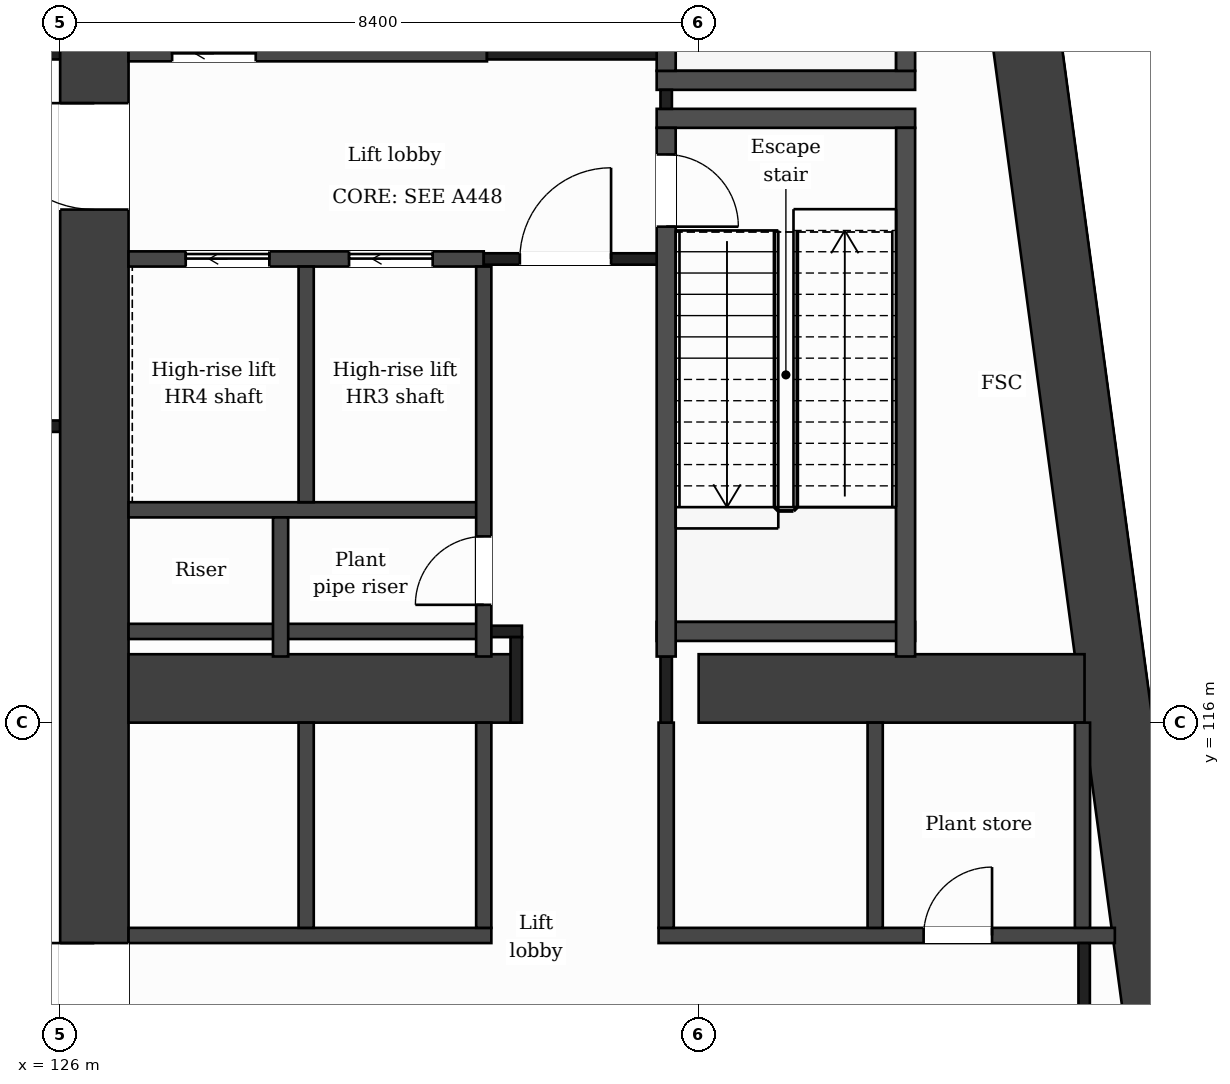
"""IFC4 building model, lengths in metres.
Left out: names, types, materials, properties, quantities, classifications, styles, units other than length and angle.
Written with IfcOpenShell. Run it as: python <this file> out.ifc"""

import sys

from ifc_helpers import new_model, si_unit, direction, frame, frame_2d, origin, place, context, subcontext, project, spatial, rectangle, extrude, element, fill, save


model = new_model("IFC4")
c1 = context("Model", 3, precision=1e-05, world=origin(), true_north=direction((0.0, 1.0)))
c2 = subcontext(c1, "Body", "Model", "MODEL_VIEW")
j1 = project(units=[si_unit("LENGTHUNIT", "METRE"), si_unit("PLANEANGLEUNIT", "RADIAN")], contexts=[c1])
p1 = place(None, origin())
s1 = spatial("IfcSite", under=j1, at=p1, CompositionType="ELEMENT")
p2 = place(p1, origin())
s2 = spatial("IfcBuilding", under=s1, at=p2, CompositionType="ELEMENT")
p3 = place(p2, frame((0.0, 0.0, 197.2)))
s3 = spatial("IfcBuildingStorey", under=s2, at=p3, CompositionType="ELEMENT", Elevation=197.2)
p4 = place(p3, frame((137.776, 131.95, 0.0), z_axis=(0.0, 0.0, 1.0), x_axis=(0.133421759112, -0.991059349482, 0.0)))
e1 = element("IfcWall", 1, at=p4, inside=s3, PredefinedType="SHEAR", context=c2, shape_type="SweptSolid", body=[
    extrude(rectangle(XDim=21.29, YDim=0.9, at=frame_2d((10.645, 0.0))), origin(), (0.0, 0.0, 1.0), 5.0),
])
p5 = place(p3, frame((126.45, 110.85, 0.0), z_axis=(0.0, 0.0, 1.0), x_axis=(0.0, 1.0, 0.0)))
e2 = element("IfcWall", 2, at=p5, inside=s3, PredefinedType="SHEAR", context=c2, shape_type="SweptSolid", body=[
    extrude(rectangle(XDim=21.1, YDim=0.9, at=frame_2d((10.55, 0.0))), origin(), (0.0, 0.0, 1.0), 5.0),
])
p6 = place(p5, frame((1.05, 0.0, 0.0)))
e3 = element("IfcOpeningElement", 3, at=p6, cuts=e2, PredefinedType="OPENING", context=c2, shape_type="SweptSolid", body=[
    extrude(rectangle(XDim=1.2, YDim=2.1, at=frame_2d((0.6, 1.05))), frame((0.0, 0.46, 0.0), z_axis=(0.0, -1.0, 0.0), x_axis=(1.0, 0.0, 0.0)), (0.0, 0.0, 1.0), 0.92),
])
p7 = place(p5, frame((11.9, 0.0, 0.0)))
e4 = element("IfcOpeningElement", 4, at=p7, cuts=e2, PredefinedType="OPENING", context=c2, shape_type="SweptSolid", body=[
    extrude(rectangle(XDim=1.4, YDim=2.1, at=frame_2d((0.7, 1.05))), frame((0.0, 0.46, 0.0), z_axis=(0.0, -1.0, 0.0), x_axis=(1.0, 0.0, 0.0)), (0.0, 0.0, 1.0), 0.92),
])
p8 = place(p3, frame((126.9, 116.45, 0.0), z_axis=(0.0, 0.0, 1.0), x_axis=(1.0, 0.0, 0.0)))
e5 = element("IfcWall", 5, at=p8, inside=s3, PredefinedType="SHEAR", context=c2, shape_type="SweptSolid", body=[
    extrude(rectangle(XDim=5.1, YDim=0.9, at=frame_2d((2.55, 0.0))), origin(), (0.0, 0.0, 1.0), 5.0),
])
p9 = place(p3, frame((134.4, 116.45, 0.0), z_axis=(0.0, 0.0, 1.0), x_axis=(1.0, 0.0, 0.0)))
e6 = element("IfcWall", 6, at=p9, inside=s3, PredefinedType="SHEAR", context=c2, shape_type="SweptSolid", body=[
    extrude(rectangle(XDim=5.077, YDim=0.9, at=frame_2d((2.539, 0.0))), origin(), (0.0, 0.0, 1.0), 5.0),
])
p10 = place(p3, frame((126.9, 113.2, 0.0), z_axis=(0.0, 0.0, 1.0), x_axis=(1.0, 0.0, 0.0)))
e7 = element("IfcWall", 7, at=p10, inside=s3, PredefinedType="PARTITIONING", context=c2, shape_type="SweptSolid", body=[
    extrude(rectangle(XDim=4.773, YDim=0.2, at=frame_2d((2.387, 0.0))), origin(), (0.0, 0.0, 1.0), 4.68),
])
p11 = place(p3, frame((133.873, 113.2, 0.0), z_axis=(0.0, 0.0, 1.0), x_axis=(1.0, 0.0, 0.0)))
e8 = element("IfcWall", 8, at=p11, inside=s3, PredefinedType="PARTITIONING", context=c2, shape_type="SweptSolid", body=[
    extrude(rectangle(XDim=6.003, YDim=0.2, at=frame_2d((3.001, 0.0))), origin(), (0.0, 0.0, 1.0), 4.68),
])
p12 = place(p11, frame((3.487, 0.0, 0.0)))
e9 = element("IfcOpeningElement", 9, at=p12, cuts=e8, PredefinedType="OPENING", context=c2, shape_type="SweptSolid", body=[
    extrude(rectangle(XDim=0.9, YDim=2.1, at=frame_2d((0.45, 1.05))), frame((0.0, 0.11, 0.0), z_axis=(0.0, -1.0, 0.0), x_axis=(1.0, 0.0, 0.0)), (0.0, 0.0, 1.0), 0.22),
])
p13 = place(p3, frame((126.9, 117.2, 0.0), z_axis=(0.0, 0.0, 1.0), x_axis=(1.0, 0.0, 0.0)))
e10 = element("IfcWall", 10, at=p13, inside=s3, PredefinedType="PARTITIONING", context=c2, shape_type="SweptSolid", body=[
    extrude(rectangle(XDim=4.673, YDim=0.2, at=frame_2d((2.336, 0.0))), origin(), (0.0, 0.0, 1.0), 4.68),
])
p14 = place(p3, frame((131.573, 117.2, 0.0), z_axis=(0.0, 0.0, 1.0), x_axis=(1.0, 0.0, 0.0)))
e11 = element("IfcWall", 11, at=p14, inside=s3, PredefinedType="PARTITIONING", context=c2, shape_type="SweptSolid", body=[
    extrude(rectangle(XDim=0.502, YDim=0.15, at=frame_2d((0.251, 0.0))), origin(), (0.0, 0.0, 1.0), 4.68),
])
p15 = place(p3, frame((133.848, 117.2, 0.0), z_axis=(0.0, 0.0, 1.0), x_axis=(1.0, 0.0, 0.0)))
e12 = element("IfcWall", 12, at=p15, inside=s3, PredefinedType="PARTITIONING", context=c2, shape_type="SweptSolid", body=[
    extrude(rectangle(XDim=3.4, YDim=0.25, at=frame_2d((1.7, 0.0))), origin(), (0.0, 0.0, 1.0), 4.68),
])
p16 = place(p3, frame((126.9, 118.8, 0.0), z_axis=(0.0, 0.0, 1.0), x_axis=(1.0, 0.0, 0.0)))
e13 = element("IfcWall", 13, at=p16, inside=s3, PredefinedType="PARTITIONING", context=c2, shape_type="SweptSolid", body=[
    extrude(rectangle(XDim=4.673, YDim=0.2, at=frame_2d((2.336, 0.0))), origin(), (0.0, 0.0, 1.0), 4.68),
])
p17 = place(p3, frame((100.8, 119.9, 0.0), z_axis=(0.0, 0.0, 1.0), x_axis=(1.0, 0.0, 0.0)))
e14 = element("IfcWall", 14, at=p17, inside=s3, PredefinedType="PARTITIONING", context=c2, shape_type="SweptSolid", body=[
    extrude(rectangle(XDim=25.2, YDim=0.15, at=frame_2d((12.6, 0.0))), origin(), (0.0, 0.0, 1.0), 4.68),
])
p18 = place(p17, frame((3.6, 0.0, 0.0)))
e15 = element("IfcOpeningElement", 15, at=p18, cuts=e14, PredefinedType="OPENING", context=c2, shape_type="SweptSolid", body=[
    extrude(rectangle(XDim=1.2, YDim=2.1, at=frame_2d((0.6, 1.05))), frame((0.0, 0.085, 0.0), z_axis=(0.0, -1.0, 0.0), x_axis=(1.0, 0.0, 0.0)), (0.0, 0.0, 1.0), 0.17),
])
p19 = place(p17, frame((12.0, 0.0, 0.0)))
e16 = element("IfcOpeningElement", 16, at=p19, cuts=e14, PredefinedType="OPENING", context=c2, shape_type="SweptSolid", body=[
    extrude(rectangle(XDim=1.2, YDim=2.1, at=frame_2d((0.6, 1.05))), frame((0.0, 0.085, 0.0), z_axis=(0.0, -1.0, 0.0), x_axis=(1.0, 0.0, 0.0)), (0.0, 0.0, 1.0), 0.17),
])
p20 = place(p17, frame((20.4, 0.0, 0.0)))
e17 = element("IfcOpeningElement", 17, at=p20, cuts=e14, PredefinedType="OPENING", context=c2, shape_type="SweptSolid", body=[
    extrude(rectangle(XDim=1.2, YDim=2.1, at=frame_2d((0.6, 1.05))), frame((0.0, 0.085, 0.0), z_axis=(0.0, -1.0, 0.0), x_axis=(1.0, 0.0, 0.0)), (0.0, 0.0, 1.0), 0.17),
])
p21 = place(p3, frame((126.9, 122.1, 0.0), z_axis=(0.0, 0.0, 1.0), x_axis=(1.0, 0.0, 0.0)))
e18 = element("IfcWall", 18, at=p21, inside=s3, PredefinedType="PARTITIONING", context=c2, shape_type="SweptSolid", body=[
    extrude(rectangle(XDim=4.673, YDim=0.2, at=frame_2d((2.336, 0.0))), origin(), (0.0, 0.0, 1.0), 4.68),
])
p22 = place(p21, frame((2.901, 0.0, 0.0)))
e19 = element("IfcOpeningElement", 19, at=p22, cuts=e18, PredefinedType="OPENING", context=c2, shape_type="SweptSolid", body=[
    extrude(rectangle(XDim=1.1, YDim=2.1, at=frame_2d((0.55, 1.05))), frame((0.0, 0.11, 0.0), z_axis=(0.0, -1.0, 0.0), x_axis=(1.0, 0.0, 0.0)), (0.0, 0.0, 1.0), 0.22),
])
p23 = place(p21, frame((0.752, 0.0, 0.0)))
e20 = element("IfcOpeningElement", 20, at=p23, cuts=e18, PredefinedType="OPENING", context=c2, shape_type="SweptSolid", body=[
    extrude(rectangle(XDim=1.1, YDim=2.1, at=frame_2d((0.55, 1.05))), frame((0.0, 0.11, 0.0), z_axis=(0.0, -1.0, 0.0), x_axis=(1.0, 0.0, 0.0)), (0.0, 0.0, 1.0), 0.22),
])
p24 = place(p3, frame((131.573, 122.1, 0.0), z_axis=(0.0, 0.0, 1.0), x_axis=(1.0, 0.0, 0.0)))
e21 = element("IfcWall", 21, at=p24, inside=s3, PredefinedType="PARTITIONING", context=c2, shape_type="SweptSolid", body=[
    extrude(rectangle(XDim=2.4, YDim=0.15, at=frame_2d((1.2, 0.0))), origin(), (0.0, 0.0, 1.0), 4.68),
])
p25 = place(p24, frame((0.475, 0.0, 0.0)))
e22 = element("IfcOpeningElement", 22, at=p25, cuts=e21, PredefinedType="OPENING", context=c2, shape_type="SweptSolid", body=[
    extrude(rectangle(XDim=1.2, YDim=2.1, at=frame_2d((0.6, 1.05))), frame((0.0, 0.085, 0.0), z_axis=(0.0, -1.0, 0.0), x_axis=(1.0, 0.0, 0.0)), (0.0, 0.0, 1.0), 0.17),
])
for number, where, z_axis, x_axis in (
    (23, (133.848, 123.95, 0.0), (0.0, 0.0, 1.0), (1.0, 0.0, 0.0)),
    (24, (133.848, 124.45, 0.0), (0.0, 0.0, 1.0), (1.0, 0.0, 0.0)),
):
    element("IfcWall", number, at=place(p3, frame(where, z_axis=z_axis, x_axis=x_axis)), inside=s3, PredefinedType="PARTITIONING", context=c2, shape_type="SweptSolid", body=[
        extrude(rectangle(XDim=3.4, YDim=0.25, at=frame_2d((1.7, 0.0))), origin(), (0.0, 0.0, 1.0), 4.68),
    ])
p26 = place(p3, frame((126.9, 124.8, 0.0), z_axis=(0.0, 0.0, 1.0), x_axis=(1.0, 0.0, 0.0)))
e25 = element("IfcWall", 25, at=p26, inside=s3, PredefinedType="PARTITIONING", context=c2, shape_type="SweptSolid", body=[
    extrude(rectangle(XDim=4.715, YDim=0.2, at=frame_2d((2.358, 0.0))), origin(), (0.0, 0.0, 1.0), 4.68),
])
p27 = place(p26, frame((0.573, 0.0, 0.0)))
e26 = element("IfcOpeningElement", 26, at=p27, cuts=e25, PredefinedType="OPENING", context=c2, shape_type="SweptSolid", body=[
    extrude(rectangle(XDim=1.1, YDim=2.1, at=frame_2d((0.55, 1.05))), frame((0.0, 0.11, 0.0), z_axis=(0.0, -1.0, 0.0), x_axis=(1.0, 0.0, 0.0)), (0.0, 0.0, 1.0), 0.22),
])
p28 = place(p3, frame((131.615, 124.8, 0.0), z_axis=(0.0, 0.0, 1.0), x_axis=(1.0, 0.0, 0.0)))
e27 = element("IfcWall", 27, at=p28, inside=s3, PredefinedType="PARTITIONING", context=c2, shape_type="SweptSolid", body=[
    extrude(rectangle(XDim=2.483, YDim=0.15, at=frame_2d((1.241, 0.0))), origin(), (0.0, 0.0, 1.0), 4.68),
])
p29 = place(p3, frame((100.8, 124.8, 0.0), z_axis=(0.0, 0.0, 1.0), x_axis=(1.0, 0.0, 0.0)))
e28 = element("IfcWall", 28, at=p29, inside=s3, PredefinedType="PARTITIONING", context=c2, shape_type="SweptSolid", body=[
    extrude(rectangle(XDim=25.2, YDim=0.15, at=frame_2d((12.6, 0.0))), origin(), (0.0, 0.0, 1.0), 4.68),
])
p30 = place(p29, frame((3.6, 0.0, 0.0)))
e29 = element("IfcOpeningElement", 29, at=p30, cuts=e28, PredefinedType="OPENING", context=c2, shape_type="SweptSolid", body=[
    extrude(rectangle(XDim=1.2, YDim=2.1, at=frame_2d((0.6, 1.05))), frame((0.0, 0.085, 0.0), z_axis=(0.0, -1.0, 0.0), x_axis=(1.0, 0.0, 0.0)), (0.0, 0.0, 1.0), 0.17),
])
p31 = place(p29, frame((12.0, 0.0, 0.0)))
e30 = element("IfcOpeningElement", 30, at=p31, cuts=e28, PredefinedType="OPENING", context=c2, shape_type="SweptSolid", body=[
    extrude(rectangle(XDim=1.2, YDim=2.1, at=frame_2d((0.6, 1.05))), frame((0.0, 0.085, 0.0), z_axis=(0.0, -1.0, 0.0), x_axis=(1.0, 0.0, 0.0)), (0.0, 0.0, 1.0), 0.17),
])
p32 = place(p29, frame((20.4, 0.0, 0.0)))
e31 = element("IfcOpeningElement", 31, at=p32, cuts=e28, PredefinedType="OPENING", context=c2, shape_type="SweptSolid", body=[
    extrude(rectangle(XDim=1.2, YDim=2.1, at=frame_2d((0.6, 1.05))), frame((0.0, 0.085, 0.0), z_axis=(0.0, -1.0, 0.0), x_axis=(1.0, 0.0, 0.0)), (0.0, 0.0, 1.0), 0.17),
])
p33 = place(p3, frame((128.9, 116.87, 0.0), z_axis=(0.0, 0.0, 1.0), x_axis=(0.0, 1.0, 0.0)))
e32 = element("IfcWall", 32, at=p33, inside=s3, PredefinedType="PARTITIONING", context=c2, shape_type="SweptSolid", body=[
    extrude(rectangle(XDim=1.83, YDim=0.2, at=frame_2d((0.915, 0.0))), origin(), (0.0, 0.0, 1.0), 4.68),
])
p34 = place(p3, frame((129.237, 113.3, 0.0), z_axis=(0.0, 0.0, 1.0), x_axis=(0.0, 1.0, 0.0)))
e33 = element("IfcWall", 33, at=p34, inside=s3, PredefinedType="PARTITIONING", context=c2, shape_type="SweptSolid", body=[
    extrude(rectangle(XDim=2.7, YDim=0.2, at=frame_2d((1.35, 0.0))), origin(), (0.0, 0.0, 1.0), 4.68),
])
p35 = place(p3, frame((129.237, 118.9, 0.0), z_axis=(0.0, 0.0, 1.0), x_axis=(0.0, 1.0, 0.0)))
e34 = element("IfcWall", 34, at=p35, inside=s3, PredefinedType="PARTITIONING", context=c2, shape_type="SweptSolid", body=[
    extrude(rectangle(XDim=3.1, YDim=0.2, at=frame_2d((1.55, 0.0))), origin(), (0.0, 0.0, 1.0), 4.68),
])
p36 = place(p3, frame((131.573, 113.3, 0.0), z_axis=(0.0, 0.0, 1.0), x_axis=(0.0, 1.0, 0.0)))
e35 = element("IfcWall", 35, at=p36, inside=s3, PredefinedType="PARTITIONING", context=c2, shape_type="SweptSolid", body=[
    extrude(rectangle(XDim=2.7, YDim=0.2, at=frame_2d((1.35, 0.0))), origin(), (0.0, 0.0, 1.0), 4.68),
])
p37 = place(p3, frame((131.573, 116.87, 0.0), z_axis=(0.0, 0.0, 1.0), x_axis=(0.0, 1.0, 0.0)))
e36 = element("IfcWall", 36, at=p37, inside=s3, PredefinedType="PARTITIONING", context=c2, shape_type="SweptSolid", body=[
    extrude(rectangle(XDim=5.13, YDim=0.2, at=frame_2d((2.565, 0.0))), origin(), (0.0, 0.0, 1.0), 4.68),
])
p38 = place(p37, frame((0.68, 0.0, 0.0)))
e37 = element("IfcOpeningElement", 37, at=p38, cuts=e36, PredefinedType="OPENING", context=c2, shape_type="SweptSolid", body=[
    extrude(rectangle(XDim=0.9, YDim=2.1, at=frame_2d((0.45, 1.05))), frame((0.0, 0.11, 0.0), z_axis=(0.0, -1.0, 0.0), x_axis=(1.0, 0.0, 0.0)), (0.0, 0.0, 1.0), 0.22),
])
p39 = place(p3, frame((132.0, 116.0, 0.0), z_axis=(0.0, 0.0, 1.0), x_axis=(0.0, 1.0, 0.0)))
e38 = element("IfcWall", 38, at=p39, inside=s3, PredefinedType="PARTITIONING", context=c2, shape_type="SweptSolid", body=[
    extrude(rectangle(XDim=1.125, YDim=0.15, at=frame_2d((0.562, 0.0))), origin(), (0.0, 0.0, 1.0), 4.68),
])
p40 = place(p3, frame((133.973, 113.3, 0.0), z_axis=(0.0, 0.0, 1.0), x_axis=(0.0, 1.0, 0.0)))
e39 = element("IfcWall", 39, at=p40, inside=s3, PredefinedType="PARTITIONING", context=c2, shape_type="SweptSolid", body=[
    extrude(rectangle(XDim=2.7, YDim=0.2, at=frame_2d((1.35, 0.0))), origin(), (0.0, 0.0, 1.0), 4.68),
])
p41 = place(p3, frame((133.973, 116.0, 0.0), z_axis=(0.0, 0.0, 1.0), x_axis=(0.0, 1.0, 0.0)))
e40 = element("IfcWall", 40, at=p41, inside=s3, PredefinedType="PARTITIONING", context=c2, shape_type="SweptSolid", body=[
    extrude(rectangle(XDim=0.87, YDim=0.15, at=frame_2d((0.435, 0.0))), origin(), (0.0, 0.0, 1.0), 4.68),
])
p42 = place(p3, frame((133.973, 124.075, 0.0), z_axis=(0.0, 0.0, 1.0), x_axis=(0.0, 1.0, 0.0)))
e41 = element("IfcWall", 41, at=p42, inside=s3, PredefinedType="PARTITIONING", context=c2, shape_type="SweptSolid", body=[
    extrude(rectangle(XDim=0.25, YDim=0.15, at=frame_2d((0.125, 0.0))), origin(), (0.0, 0.0, 1.0), 4.68),
])
p43 = place(p3, frame((133.973, 116.87, 0.0), z_axis=(0.0, 0.0, 1.0), x_axis=(0.0, 1.0, 0.0)))
e42 = element("IfcWall", 42, at=p43, inside=s3, PredefinedType="PARTITIONING", context=c2, shape_type="SweptSolid", body=[
    extrude(rectangle(XDim=6.955, YDim=0.25, at=frame_2d((3.478, 0.0))), origin(), (0.0, 0.0, 1.0), 4.68),
])
p44 = place(p43, frame((5.655, 0.0, 0.0)))
e43 = element("IfcOpeningElement", 43, at=p44, cuts=e42, PredefinedType="OPENING", context=c2, shape_type="SweptSolid", body=[
    extrude(rectangle(XDim=0.95, YDim=2.1, at=frame_2d((0.475, 1.05))), frame((0.0, 0.135, 0.0), z_axis=(0.0, -1.0, 0.0), x_axis=(1.0, 0.0, 0.0)), (0.0, 0.0, 1.0), 0.27),
])
p45 = place(p3, frame((133.973, 124.575, 0.0), z_axis=(0.0, 0.0, 1.0), x_axis=(0.0, 1.0, 0.0)))
e44 = element("IfcWall", 44, at=p45, inside=s3, PredefinedType="PARTITIONING", context=c2, shape_type="SweptSolid", body=[
    extrude(rectangle(XDim=6.955, YDim=0.25, at=frame_2d((3.478, 0.0))), origin(), (0.0, 0.0, 1.0), 4.68),
])
p46 = place(p45, frame((5.325, 0.0, 0.0)))
e45 = element("IfcOpeningElement", 45, at=p46, cuts=e44, PredefinedType="OPENING", context=c2, shape_type="SweptSolid", body=[
    extrude(rectangle(XDim=1.0, YDim=2.1, at=frame_2d((0.5, 1.05))), frame((0.0, 0.135, 0.0), z_axis=(0.0, -1.0, 0.0), x_axis=(1.0, 0.0, 0.0)), (0.0, 0.0, 1.0), 0.27),
])
p47 = place(p3, frame((136.722, 113.3, 0.0), z_axis=(0.0, 0.0, 1.0), x_axis=(0.0, 1.0, 0.0)))
e46 = element("IfcWall", 46, at=p47, inside=s3, PredefinedType="PARTITIONING", context=c2, shape_type="SweptSolid", body=[
    extrude(rectangle(XDim=2.7, YDim=0.2, at=frame_2d((1.35, 0.0))), origin(), (0.0, 0.0, 1.0), 4.68),
])
p48 = place(p3, frame((137.123, 116.87, 0.0), z_axis=(0.0, 0.0, 1.0), x_axis=(0.0, 1.0, 0.0)))
e47 = element("IfcWall", 47, at=p48, inside=s3, PredefinedType="PARTITIONING", context=c2, shape_type="SweptSolid", body=[
    extrude(rectangle(XDim=6.955, YDim=0.25, at=frame_2d((3.478, 0.0))), origin(), (0.0, 0.0, 1.0), 4.68),
])
p49 = place(p3, frame((137.123, 124.575, 0.0), z_axis=(0.0, 0.0, 1.0), x_axis=(0.0, 1.0, 0.0)))
e48 = element("IfcWall", 48, at=p49, inside=s3, PredefinedType="PARTITIONING", context=c2, shape_type="SweptSolid", body=[
    extrude(rectangle(XDim=6.955, YDim=0.25, at=frame_2d((3.478, 0.0))), origin(), (0.0, 0.0, 1.0), 4.68),
])
p50 = place(p3, frame((139.45, 113.3, 0.0), z_axis=(0.0, 0.0, 1.0), x_axis=(0.0, 1.0, 0.0)))
e49 = element("IfcWall", 49, at=p50, inside=s3, PredefinedType="PARTITIONING", context=c2, shape_type="SweptSolid", body=[
    extrude(rectangle(XDim=2.7, YDim=0.2, at=frame_2d((1.35, 0.0))), origin(), (0.0, 0.0, 1.0), 4.68),
])
p51 = place(p3, frame((139.472, 111.3, 0.0), z_axis=(0.0, 0.0, 1.0), x_axis=(0.0, 1.0, 0.0)))
e50 = element("IfcWall", 50, at=p51, inside=s3, PredefinedType="PARTITIONING", context=c2, shape_type="SweptSolid", body=[
    extrude(rectangle(XDim=1.8, YDim=0.15, at=frame_2d((0.9, 0.0))), origin(), (0.0, 0.0, 1.0), 4.68),
])
p52 = place(p25, origin())
e51 = element("IfcDoor", 51, at=p52, inside=s3, OperationType="SINGLE_SWING_RIGHT", PredefinedType="DOOR", context=c2, shape_type="SweptSolid", body=[
    extrude(rectangle(XDim=1.2, YDim=2.1, at=frame_2d((0.6, 1.05))), frame((0.0, 0.025, 0.0), z_axis=(0.0, -1.0, 0.0), x_axis=(1.0, 0.0, 0.0)), (0.0, 0.0, 1.0), 0.05),
])
fill(e22, e51)
p53 = place(p22, origin())
e52 = element("IfcDoor", 52, at=p53, inside=s3, OperationType="SLIDING_TO_LEFT", PredefinedType="DOOR", context=c2, shape_type="SweptSolid", body=[
    extrude(rectangle(XDim=1.1, YDim=2.1, at=frame_2d((0.55, 1.05))), frame((0.0, 0.025, 0.0), z_axis=(0.0, -1.0, 0.0), x_axis=(1.0, 0.0, 0.0)), (0.0, 0.0, 1.0), 0.05),
])
fill(e19, e52)
p54 = place(p23, origin())
e53 = element("IfcDoor", 53, at=p54, inside=s3, OperationType="SLIDING_TO_LEFT", PredefinedType="DOOR", context=c2, shape_type="SweptSolid", body=[
    extrude(rectangle(XDim=1.1, YDim=2.1, at=frame_2d((0.55, 1.05))), frame((0.0, 0.025, 0.0), z_axis=(0.0, -1.0, 0.0), x_axis=(1.0, 0.0, 0.0)), (0.0, 0.0, 1.0), 0.05),
])
fill(e20, e53)
p55 = place(p27, origin())
e54 = element("IfcDoor", 54, at=p55, inside=s3, OperationType="SLIDING_TO_LEFT", PredefinedType="DOOR", context=c2, shape_type="SweptSolid", body=[
    extrude(rectangle(XDim=1.1, YDim=2.1, at=frame_2d((0.55, 1.05))), frame((0.0, 0.025, 0.0), z_axis=(0.0, -1.0, 0.0), x_axis=(1.0, 0.0, 0.0)), (0.0, 0.0, 1.0), 0.05),
])
fill(e26, e54)
p56 = place(p44, origin())
e55 = element("IfcDoor", 55, at=p56, inside=s3, OperationType="SINGLE_SWING_LEFT", PredefinedType="DOOR", context=c2, shape_type="SweptSolid", body=[
    extrude(rectangle(XDim=0.95, YDim=2.1, at=frame_2d((0.475, 1.05))), frame((0.0, 0.025, 0.0), z_axis=(0.0, -1.0, 0.0), x_axis=(1.0, 0.0, 0.0)), (0.0, 0.0, 1.0), 0.05),
])
fill(e43, e55)
p57 = place(p38, origin())
e56 = element("IfcDoor", 56, at=p57, inside=s3, OperationType="SINGLE_SWING_LEFT", PredefinedType="DOOR", context=c2, shape_type="SweptSolid", body=[
    extrude(rectangle(XDim=0.9, YDim=2.1, at=frame_2d((0.45, 1.05))), frame((0.0, 0.025, 0.0), z_axis=(0.0, -1.0, 0.0), x_axis=(1.0, 0.0, 0.0)), (0.0, 0.0, 1.0), 0.05),
])
fill(e37, e56)
p58 = place(p12, origin())
e57 = element("IfcDoor", 57, at=p58, inside=s3, OperationType="SINGLE_SWING_RIGHT", PredefinedType="DOOR", context=c2, shape_type="SweptSolid", body=[
    extrude(rectangle(XDim=0.9, YDim=2.1, at=frame_2d((0.45, 1.05))), frame((0.0, 0.025, 0.0), z_axis=(0.0, -1.0, 0.0), x_axis=(1.0, 0.0, 0.0)), (0.0, 0.0, 1.0), 0.05),
])
fill(e9, e57)
p59 = place(p6, origin())
e58 = element("IfcDoor", 58, at=p59, inside=s3, OperationType="SINGLE_SWING_RIGHT", PredefinedType="DOOR", context=c2, shape_type="SweptSolid", body=[
    extrude(rectangle(XDim=1.2, YDim=2.1, at=frame_2d((0.6, 1.05))), frame((0.0, 0.025, 0.0), z_axis=(0.0, -1.0, 0.0), x_axis=(1.0, 0.0, 0.0)), (0.0, 0.0, 1.0), 0.05),
])
fill(e3, e58)
p60 = place(p7, origin())
e59 = element("IfcDoor", 59, at=p60, inside=s3, OperationType="SINGLE_SWING_RIGHT", PredefinedType="DOOR", context=c2, shape_type="SweptSolid", body=[
    extrude(rectangle(XDim=1.4, YDim=2.1, at=frame_2d((0.7, 1.05))), frame((0.0, 0.025, 0.0), z_axis=(0.0, -1.0, 0.0), x_axis=(1.0, 0.0, 0.0)), (0.0, 0.0, 1.0), 0.05),
])
fill(e4, e59)
save(model, sys.argv[1])
